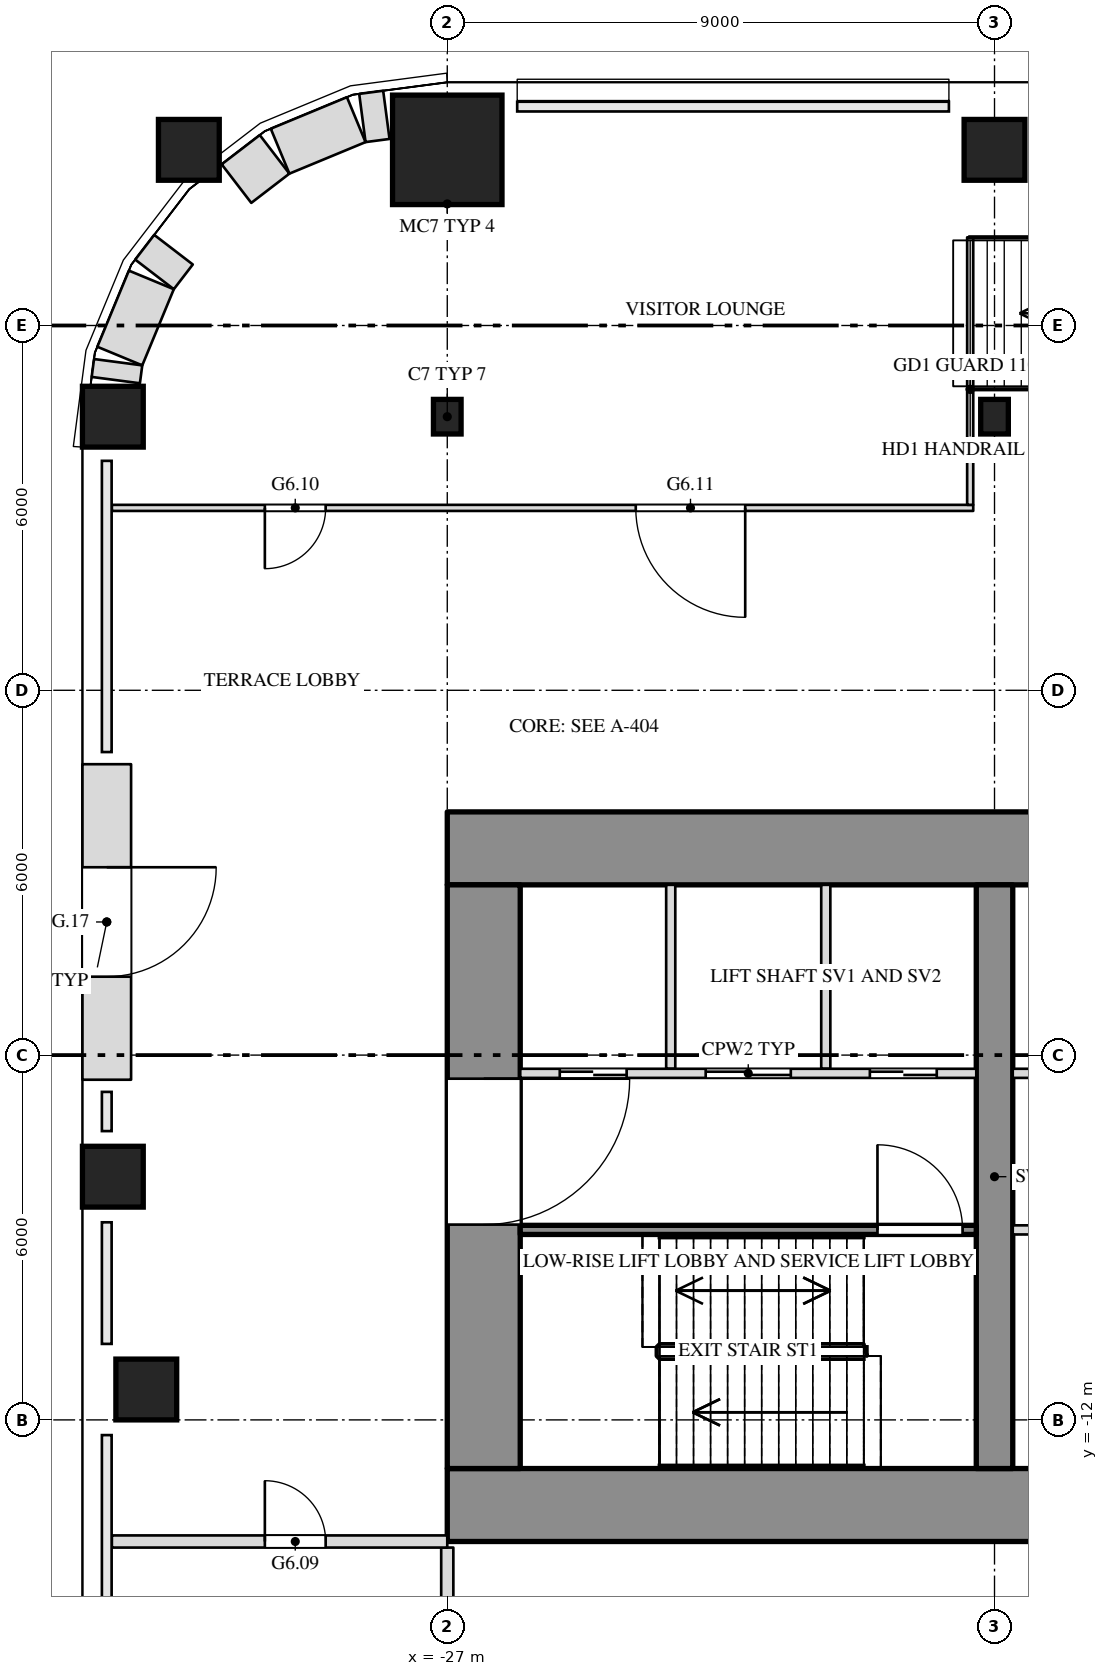
"""IFC4 building model, lengths in metres.
Left out: names, types, materials, properties, quantities, classifications, styles, units other than length and angle.
Written with IfcOpenShell. Run it as: python <this file> out.ifc"""

import sys

from ifc_helpers import new_model, si_unit, direction, frame, frame_2d, origin, origin_2d, place, context, subcontext, project, spatial, rectangle, i_section, extrude, clip, halfspace, element, fill, save


model = new_model("IFC4")
c1 = context("Model", 3, precision=1e-05, world=origin(), true_north=direction((0.0, 1.0)))
c2 = subcontext(c1, "Body", "Model", "MODEL_VIEW")
j1 = project(units=[si_unit("LENGTHUNIT", "METRE"), si_unit("PLANEANGLEUNIT", "RADIAN")], contexts=[c1])
p1 = place(None, origin())
s1 = spatial("IfcSite", under=j1, at=p1, CompositionType="ELEMENT")
p2 = place(p1, origin())
s2 = spatial("IfcBuilding", under=s1, at=p2, CompositionType="ELEMENT")
p3 = place(p2, frame((0.0, 0.0, 39.0)))
s3 = spatial("IfcBuildingStorey", under=s2, at=p3, CompositionType="ELEMENT", Elevation=39.0)
for number, where, z_axis, x_axis in (
    (1, (-31.95, -11.5, 0.0), (0.0, 0.0, 1.0), (1.0, 0.0, 0.0)),
    (2, (-32.5, -8.0, 0.0), (0.0, 0.0, 1.0), (1.0, 0.0, 0.0)),
    (3, (-32.5, 4.5, 0.0), (0.0, 0.0, 1.0), (1.0, 0.0, 0.0)),
):
    element("IfcColumn", number, at=place(p3, frame(where, z_axis=z_axis, x_axis=x_axis)), inside=s3, PredefinedType="COLUMN", context=c2, shape_type="SweptSolid", body=[
        extrude(rectangle(XDim=1.0, YDim=1.0, at=origin_2d()), origin(), (0.0, 0.0, 1.0), 4.5),
    ])
for number, where, z_axis, x_axis in (
    (4, (-27.0, 4.5, 0.0), (0.0, 0.0, 1.0), (1.0, 0.0, 0.0)),
    (5, (-18.0, 4.5, 0.0), (0.0, 0.0, 1.0), (1.0, 0.0, 0.0)),
):
    element("IfcColumn", number, at=place(p3, frame(where, z_axis=z_axis, x_axis=x_axis)), inside=s3, PredefinedType="COLUMN", context=c2, shape_type="SweptSolid", body=[
        extrude(i_section(OverallWidth=0.455, OverallDepth=0.569, WebThickness=0.078, FlangeThickness=0.125, at=origin_2d()), origin(), (0.0, 0.0, 1.0), 4.5),
    ])
p4 = place(p3, frame((-31.25, 8.0, 0.0), z_axis=(0.0, 0.595218167181, 0.80356414396), x_axis=(-1.0, 0.0, 0.0)))
e6 = element("IfcColumn", 6, at=p4, inside=s3, PredefinedType="COLUMN", context=c2, shape_type="Clipping", body=[
    clip(extrude(rectangle(XDim=1.0, YDim=1.0, at=origin_2d()), origin(), (0.0, 0.0, 1.0), 5.6), halfspace(frame((0.0, 0.0, 0.37)), True)),
])
p5 = place(p3, frame((-27.0, 8.0, 0.0), z_axis=(0.0, 0.595218167181, 0.80356414396), x_axis=(-1.0, 0.0, 0.0)))
e7 = element("IfcColumn", 7, at=p5, inside=s3, PredefinedType="COLUMN", context=c2, shape_type="Clipping", body=[
    clip(extrude(rectangle(XDim=1.8, YDim=1.8, at=origin_2d()), origin(), (0.0, 0.0, 1.0), 5.6), halfspace(frame((0.0, 0.0, 0.667)), True)),
])
p6 = place(p3, frame((-18.0, 8.0, 0.0), z_axis=(0.0, 0.595218167181, 0.80356414396), x_axis=(-1.0, 0.0, 0.0)))
e8 = element("IfcColumn", 8, at=p6, inside=s3, PredefinedType="COLUMN", context=c2, shape_type="Clipping", body=[
    clip(extrude(rectangle(XDim=1.0, YDim=1.0, at=origin_2d()), origin(), (0.0, 0.0, 1.0), 5.6), halfspace(frame((0.0, 0.0, 0.37)), True)),
])
p7 = place(p3, frame((-27.0, -2.6, 0.0), z_axis=(0.0, 0.0, 1.0), x_axis=(1.0, 0.0, 0.0)))
e9 = element("IfcWall", 9, at=p7, inside=s3, PredefinedType="SHEAR", context=c2, shape_type="SweptSolid", body=[
    extrude(rectangle(XDim=54.0, YDim=1.2, at=frame_2d((27.0, 0.0))), origin(), (0.0, 0.0, 1.0), 4.25),
])
p8 = place(p7, frame((15.15, 0.0, 0.0)))
e10 = element("IfcOpeningElement", 10, at=p8, cuts=e9, PredefinedType="OPENING", context=c2, shape_type="SweptSolid", body=[
    extrude(rectangle(XDim=2.4, YDim=2.1, at=frame_2d((1.2, 1.05))), frame((0.0, 0.612, 0.0), z_axis=(0.0, -1.0, 0.0), x_axis=(1.0, 0.0, 0.0)), (0.0, 0.0, 1.0), 1.224),
])
p9 = place(p7, frame((36.45, 0.0, 0.0)))
e11 = element("IfcOpeningElement", 11, at=p9, cuts=e9, PredefinedType="OPENING", context=c2, shape_type="SweptSolid", body=[
    extrude(rectangle(XDim=2.4, YDim=2.1, at=frame_2d((1.2, 1.05))), frame((0.0, 0.612, 0.0), z_axis=(0.0, -1.0, 0.0), x_axis=(1.0, 0.0, 0.0)), (0.0, 0.0, 1.0), 1.224),
])
p10 = place(p3, frame((-27.0, -13.4, 0.0), z_axis=(0.0, 0.0, 1.0), x_axis=(1.0, 0.0, 0.0)))
e12 = element("IfcWall", 12, at=p10, inside=s3, PredefinedType="SHEAR", context=c2, shape_type="SweptSolid", body=[
    extrude(rectangle(XDim=54.0, YDim=1.2, at=frame_2d((27.0, 0.0))), origin(), (0.0, 0.0, 1.0), 4.25),
])
p11 = place(p10, frame((16.45, 0.0, 0.0)))
e13 = element("IfcOpeningElement", 13, at=p11, cuts=e12, PredefinedType="OPENING", context=c2, shape_type="SweptSolid", body=[
    extrude(rectangle(XDim=1.0, YDim=2.1, at=frame_2d((0.5, 1.05))), frame((0.0, 0.612, 0.0), z_axis=(0.0, -1.0, 0.0), x_axis=(1.0, 0.0, 0.0)), (0.0, 0.0, 1.0), 1.224),
])
p12 = place(p10, frame((36.55, 0.0, 0.0)))
e14 = element("IfcOpeningElement", 14, at=p12, cuts=e12, PredefinedType="OPENING", context=c2, shape_type="SweptSolid", body=[
    extrude(rectangle(XDim=1.0, YDim=2.1, at=frame_2d((0.5, 1.05))), frame((0.0, 0.612, 0.0), z_axis=(0.0, -1.0, 0.0), x_axis=(1.0, 0.0, 0.0)), (0.0, 0.0, 1.0), 1.224),
])
p13 = place(p3, frame((-26.4, -12.8, 0.0), z_axis=(0.0, 0.0, 1.0), x_axis=(0.0, 1.0, 0.0)))
e15 = element("IfcWall", 15, at=p13, inside=s3, PredefinedType="SHEAR", context=c2, shape_type="SweptSolid", body=[
    extrude(rectangle(XDim=9.6, YDim=1.2, at=frame_2d((4.8, 0.0))), origin(), (0.0, 0.0, 1.0), 4.25),
])
p14 = place(p13, frame((4.012, 0.0, 0.0)))
e16 = element("IfcOpeningElement", 16, at=p14, cuts=e15, PredefinedType="OPENING", context=c2, shape_type="SweptSolid", body=[
    extrude(rectangle(XDim=2.4, YDim=2.1, at=frame_2d((1.2, 1.05))), frame((0.0, 0.612, 0.0), z_axis=(0.0, -1.0, 0.0), x_axis=(1.0, 0.0, 0.0)), (0.0, 0.0, 1.0), 1.224),
])
p15 = place(p3, frame((-18.0, -12.8, 0.0), z_axis=(0.0, 0.0, 1.0), x_axis=(0.0, 1.0, 0.0)))
e17 = element("IfcWall", 17, at=p15, inside=s3, PredefinedType="SHEAR", context=c2, shape_type="SweptSolid", body=[
    extrude(rectangle(XDim=9.6, YDim=0.6, at=frame_2d((4.8, 0.0))), origin(), (0.0, 0.0, 1.0), 4.25),
])
p16 = place(p3, frame((-27.0, -17.0, 0.0), z_axis=(0.0, 0.0, 1.0), x_axis=(0.0, 1.0, 0.0)))
e18 = element("IfcWall", 18, at=p16, inside=s3, PredefinedType="PARTITIONING", context=c2, shape_type="SweptSolid", body=[
    extrude(rectangle(XDim=2.9, YDim=0.2, at=frame_2d((1.45, 0.0))), origin(), (0.0, 0.0, 1.0), 3.638),
])
p17 = place(p3, frame((-32.516, -14.0, 0.0), z_axis=(0.0, 0.0, 1.0), x_axis=(1.0, 0.0, 0.0)))
e19 = element("IfcWall", 19, at=p17, inside=s3, PredefinedType="PARTITIONING", context=c2, shape_type="SweptSolid", body=[
    extrude(rectangle(XDim=5.516, YDim=0.2, at=frame_2d((2.758, 0.0))), origin(), (0.0, 0.0, 1.0), 4.25),
])
p18 = place(p17, frame((2.516, 0.0, 0.0)))
e20 = element("IfcOpeningElement", 20, at=p18, cuts=e19, PredefinedType="OPENING", context=c2, shape_type="SweptSolid", body=[
    extrude(rectangle(XDim=1.0, YDim=2.1, at=frame_2d((0.5, 1.05))), frame((0.0, 0.112, 0.0), z_axis=(0.0, -1.0, 0.0), x_axis=(1.0, 0.0, 0.0)), (0.0, 0.0, 1.0), 0.224),
])
p19 = place(p3, frame((-32.516, 3.0, 0.0), z_axis=(0.0, 0.0, 1.0), x_axis=(1.0, 0.0, 0.0)))
e21 = element("IfcWall", 21, at=p19, inside=s3, PredefinedType="PARTITIONING", context=c2, shape_type="SweptSolid", body=[
    extrude(rectangle(XDim=14.166, YDim=0.1, at=frame_2d((7.083, 0.0))), origin(), (0.0, 0.0, 1.0), 4.25),
])
p20 = place(p19, frame((2.516, 0.0, 0.0)))
e22 = element("IfcOpeningElement", 22, at=p20, cuts=e21, PredefinedType="OPENING", context=c2, shape_type="SweptSolid", body=[
    extrude(rectangle(XDim=1.0, YDim=2.1, at=frame_2d((0.5, 1.05))), frame((0.0, 0.062, 0.0), z_axis=(0.0, -1.0, 0.0), x_axis=(1.0, 0.0, 0.0)), (0.0, 0.0, 1.0), 0.124),
])
p21 = place(p19, frame((8.616, 0.0, 0.0)))
e23 = element("IfcOpeningElement", 23, at=p21, cuts=e21, PredefinedType="OPENING", context=c2, shape_type="SweptSolid", body=[
    extrude(rectangle(XDim=1.8, YDim=2.1, at=frame_2d((0.9, 1.05))), frame((0.0, 0.062, 0.0), z_axis=(0.0, -1.0, 0.0), x_axis=(1.0, 0.0, 0.0)), (0.0, 0.0, 1.0), 0.124),
])
p22 = place(p3, frame((-18.4, 3.05, 0.0), z_axis=(0.0, 0.0, 1.0), x_axis=(0.0, 1.0, 0.0)))
e24 = element("IfcWall", 24, at=p22, inside=s3, PredefinedType="PARTITIONING", context=c2, shape_type="SweptSolid", body=[
    extrude(rectangle(XDim=4.4, YDim=0.1, at=frame_2d((2.2, 0.0))), origin(), (0.0, 0.0, 1.0), 4.25),
])
p23 = place(p3, frame((-28.002, 9.465, 0.0), z_axis=(0.0, 0.0, 1.0), x_axis=(-0.99150434256, -0.130073589494, 0.0)))
e25 = element("IfcWall", 25, at=p23, inside=s3, PredefinedType="SOLIDWALL", context=c2, shape_type="SweptSolid", body=[
    extrude(rectangle(XDim=0.398, YDim=0.8, at=frame_2d((0.199, 0.0))), origin(), (0.0, 0.0, 1.0), 4.25),
])
p24 = place(p3, frame((-28.497, 9.386, 0.0), z_axis=(0.0, 0.0, 1.0), x_axis=(-0.923847774587, -0.38276009378, 0.0)))
e26 = element("IfcWall", 26, at=p24, inside=s3, PredefinedType="SOLIDWALL", context=c2, shape_type="SweptSolid", body=[
    extrude(rectangle(XDim=1.355, YDim=0.8, at=frame_2d((0.678, 0.0))), origin(), (0.0, 0.0, 1.0), 4.25),
])
p25 = place(p3, frame((-29.84, 8.815, 0.0), z_axis=(0.0, 0.0, 1.0), x_axis=(-0.793312797286, -0.608814262039, 0.0)))
e27 = element("IfcWall", 27, at=p25, inside=s3, PredefinedType="SOLIDWALL", context=c2, shape_type="SweptSolid", body=[
    extrude(rectangle(XDim=0.79, YDim=0.8, at=frame_2d((0.395, 0.0))), origin(), (0.0, 0.0, 1.0), 4.25),
])
p26 = place(p3, frame((-31.502, 7.247, 0.0), z_axis=(0.0, 0.0, 1.0), x_axis=(-0.608721260779, -0.793384160843, 0.0)))
e28 = element("IfcWall", 28, at=p26, inside=s3, PredefinedType="SOLIDWALL", context=c2, shape_type="SweptSolid", body=[
    extrude(rectangle(XDim=0.513, YDim=0.8, at=frame_2d((0.256, 0.0))), origin(), (0.0, 0.0, 1.0), 4.25),
])
p27 = place(p3, frame((-31.867, 6.75, 0.0), z_axis=(0.0, 0.0, 1.0), x_axis=(-0.38276009378, -0.923847774587, 0.0)))
e29 = element("IfcWall", 29, at=p27, inside=s3, PredefinedType="SOLIDWALL", context=c2, shape_type="SweptSolid", body=[
    extrude(rectangle(XDim=1.355, YDim=0.8, at=frame_2d((0.678, 0.0))), origin(), (0.0, 0.0, 1.0), 4.25),
])
p28 = place(p3, frame((-32.413, 5.396, 0.0), z_axis=(0.0, 0.0, 1.0), x_axis=(-0.129901534033, -0.991526899008, 0.0)))
e30 = element("IfcWall", 30, at=p28, inside=s3, PredefinedType="SOLIDWALL", context=c2, shape_type="SweptSolid", body=[
    extrude(rectangle(XDim=0.297, YDim=0.8, at=frame_2d((0.148, 0.0))), origin(), (0.0, 0.0, 1.0), 4.25),
])
p29 = place(p3, frame((-32.6, -1.216, 0.0), z_axis=(0.0, 0.0, 1.0), x_axis=(0.0, -1.0, 0.0)))
e31 = element("IfcWall", 31, at=p29, inside=s3, PredefinedType="SOLIDWALL", context=c2, shape_type="SweptSolid", body=[
    extrude(rectangle(XDim=5.189, YDim=0.8, at=frame_2d((2.595, 0.0))), origin(), (0.0, 0.0, 1.0), 4.25),
])
p30 = place(p29, frame((1.695, 0.0, 0.0)))
e32 = element("IfcOpeningElement", 32, at=p30, cuts=e31, PredefinedType="OPENING", context=c2, shape_type="SweptSolid", body=[
    extrude(rectangle(XDim=1.8, YDim=2.4, at=frame_2d((0.9, 1.2))), frame((0.0, 0.412, 0.0), z_axis=(0.0, -1.0, 0.0), x_axis=(1.0, 0.0, 0.0)), (0.0, 0.0, 1.0), 0.824),
])
for number, where, z_axis, x_axis in (
    (33, (-20.775, -6.225, 0.0), (0.0, 0.0, 1.0), (0.0, 1.0, 0.0)),
    (34, (-23.325, -6.225, 0.0), (0.0, 0.0, 1.0), (0.0, 1.0, 0.0)),
):
    element("IfcWall", number, at=place(p3, frame(where, z_axis=z_axis, x_axis=x_axis)), inside=s3, PredefinedType="PARTITIONING", context=c2, shape_type="SweptSolid", body=[
        extrude(rectangle(XDim=3.025, YDim=0.15, at=frame_2d((1.513, 0.0))), origin(), (0.0, 0.0, 1.0), 4.25),
    ])
p31 = place(p3, frame((-25.8, -6.3, 0.0), z_axis=(0.0, 0.0, 1.0), x_axis=(1.0, 0.0, 0.0)))
e35 = element("IfcWall", 35, at=p31, inside=s3, PredefinedType="PARTITIONING", context=c2, shape_type="SweptSolid", body=[
    extrude(rectangle(XDim=7.5, YDim=0.15, at=frame_2d((3.75, 0.0))), origin(), (0.0, 0.0, 1.0), 4.25),
])
p32 = place(p31, frame((0.65, 0.0, 0.0)))
e36 = element("IfcOpeningElement", 36, at=p32, cuts=e35, PredefinedType="OPENING", context=c2, shape_type="SweptSolid", body=[
    extrude(rectangle(XDim=1.1, YDim=2.1, at=frame_2d((0.55, 1.05))), frame((0.0, 0.087, 0.0), z_axis=(0.0, -1.0, 0.0), x_axis=(1.0, 0.0, 0.0)), (0.0, 0.0, 1.0), 0.174),
])
p33 = place(p31, frame((3.05, 0.0, 0.0)))
e37 = element("IfcOpeningElement", 37, at=p33, cuts=e35, PredefinedType="OPENING", context=c2, shape_type="SweptSolid", body=[
    extrude(rectangle(XDim=1.4, YDim=2.1, at=frame_2d((0.7, 1.05))), frame((0.0, 0.087, 0.0), z_axis=(0.0, -1.0, 0.0), x_axis=(1.0, 0.0, 0.0)), (0.0, 0.0, 1.0), 0.174),
])
p34 = place(p31, frame((5.75, 0.0, 0.0)))
e38 = element("IfcOpeningElement", 38, at=p34, cuts=e35, PredefinedType="OPENING", context=c2, shape_type="SweptSolid", body=[
    extrude(rectangle(XDim=1.1, YDim=2.1, at=frame_2d((0.55, 1.05))), frame((0.0, 0.087, 0.0), z_axis=(0.0, -1.0, 0.0), x_axis=(1.0, 0.0, 0.0)), (0.0, 0.0, 1.0), 0.174),
])
p35 = place(p3, frame((-17.7, -6.3, 0.0), z_axis=(0.0, 0.0, 1.0), x_axis=(1.0, 0.0, 0.0)))
e39 = element("IfcWall", 39, at=p35, inside=s3, PredefinedType="PARTITIONING", context=c2, shape_type="SweptSolid", body=[
    extrude(rectangle(XDim=5.7, YDim=0.15, at=frame_2d((2.85, 0.0))), origin(), (0.0, 0.0, 1.0), 4.25),
])
p36 = place(p35, frame((0.8, 0.0, 0.0)))
e40 = element("IfcOpeningElement", 40, at=p36, cuts=e39, PredefinedType="OPENING", context=c2, shape_type="SweptSolid", body=[
    extrude(rectangle(XDim=1.1, YDim=2.1, at=frame_2d((0.55, 1.05))), frame((0.0, 0.087, 0.0), z_axis=(0.0, -1.0, 0.0), x_axis=(1.0, 0.0, 0.0)), (0.0, 0.0, 1.0), 0.174),
])
p37 = place(p35, frame((3.65, 0.0, 0.0)))
e41 = element("IfcOpeningElement", 41, at=p37, cuts=e39, PredefinedType="OPENING", context=c2, shape_type="SweptSolid", body=[
    extrude(rectangle(XDim=1.1, YDim=2.1, at=frame_2d((0.55, 1.05))), frame((0.0, 0.087, 0.0), z_axis=(0.0, -1.0, 0.0), x_axis=(1.0, 0.0, 0.0)), (0.0, 0.0, 1.0), 0.174),
])
p38 = place(p3, frame((-25.8, -8.875, 0.0), z_axis=(0.0, 0.0, 1.0), x_axis=(1.0, 0.0, 0.0)))
e42 = element("IfcWall", 42, at=p38, inside=s3, PredefinedType="SHEAR", context=c2, shape_type="SweptSolid", body=[
    extrude(rectangle(XDim=7.5, YDim=0.15, at=frame_2d((3.75, 0.0))), origin(), (0.0, 0.0, 1.0), 4.25),
])
p39 = place(p38, frame((5.875, 0.0, 0.0)))
e43 = element("IfcOpeningElement", 43, at=p39, cuts=e42, PredefinedType="OPENING", context=c2, shape_type="SweptSolid", body=[
    extrude(rectangle(XDim=1.4, YDim=2.1, at=frame_2d((0.7, 1.05))), frame((0.0, 0.087, 0.0), z_axis=(0.0, -1.0, 0.0), x_axis=(1.0, 0.0, 0.0)), (0.0, 0.0, 1.0), 0.174),
])
p40 = place(p3, frame((-17.7, -8.875, 0.0), z_axis=(0.0, 0.0, 1.0), x_axis=(1.0, 0.0, 0.0)))
e44 = element("IfcWall", 44, at=p40, inside=s3, PredefinedType="PARTITIONING", context=c2, shape_type="SweptSolid", body=[
    extrude(rectangle(XDim=6.9, YDim=0.15, at=frame_2d((3.45, 0.0))), origin(), (0.0, 0.0, 1.0), 4.25),
])
p41 = place(p40, frame((0.8, 0.0, 0.0)))
e45 = element("IfcOpeningElement", 45, at=p41, cuts=e44, PredefinedType="OPENING", context=c2, shape_type="SweptSolid", body=[
    extrude(rectangle(XDim=1.1, YDim=2.1, at=frame_2d((0.55, 1.05))), frame((0.0, 0.087, 0.0), z_axis=(0.0, -1.0, 0.0), x_axis=(1.0, 0.0, 0.0)), (0.0, 0.0, 1.0), 0.174),
])
p42 = place(p40, frame((3.65, 0.0, 0.0)))
e46 = element("IfcOpeningElement", 46, at=p42, cuts=e44, PredefinedType="OPENING", context=c2, shape_type="SweptSolid", body=[
    extrude(rectangle(XDim=1.1, YDim=2.1, at=frame_2d((0.55, 1.05))), frame((0.0, 0.087, 0.0), z_axis=(0.0, -1.0, 0.0), x_axis=(1.0, 0.0, 0.0)), (0.0, 0.0, 1.0), 0.174),
])
p43 = place(p18, origin())
e47 = element("IfcDoor", 47, at=p43, inside=s3, OperationType="SINGLE_SWING_LEFT", PredefinedType="DOOR", context=c2, shape_type="SweptSolid", body=[
    extrude(rectangle(XDim=1.0, YDim=2.1, at=frame_2d((0.5, 1.05))), frame((0.0, 0.025, 0.0), z_axis=(0.0, -1.0, 0.0), x_axis=(1.0, 0.0, 0.0)), (0.0, 0.0, 1.0), 0.05),
])
fill(e20, e47)
p44 = place(p20, origin())
e48 = element("IfcDoor", 48, at=p44, inside=s3, OperationType="SINGLE_SWING_RIGHT", PredefinedType="DOOR", context=c2, shape_type="SweptSolid", body=[
    extrude(rectangle(XDim=1.0, YDim=2.1, at=frame_2d((0.5, 1.05))), frame((0.0, 0.025, 0.0), z_axis=(0.0, -1.0, 0.0), x_axis=(1.0, 0.0, 0.0)), (0.0, 0.0, 1.0), 0.05),
])
fill(e22, e48)
p45 = place(p21, origin())
e49 = element("IfcDoor", 49, at=p45, inside=s3, OperationType="DOUBLE_DOOR_SINGLE_SWING", PredefinedType="DOOR", context=c2, shape_type="SweptSolid", body=[
    extrude(rectangle(XDim=1.8, YDim=2.1, at=frame_2d((0.9, 1.05))), frame((0.0, 0.025, 0.0), z_axis=(0.0, -1.0, 0.0), x_axis=(1.0, 0.0, 0.0)), (0.0, 0.0, 1.0), 0.05),
])
fill(e23, e49)
p46 = place(p30, origin())
e50 = element("IfcDoor", 50, at=p46, inside=s3, OperationType="DOUBLE_DOOR_SINGLE_SWING", PredefinedType="DOOR", context=c2, shape_type="SweptSolid", body=[
    extrude(rectangle(XDim=1.8, YDim=2.4, at=frame_2d((0.9, 1.2))), frame((0.0, 0.025, 0.0), z_axis=(0.0, -1.0, 0.0), x_axis=(1.0, 0.0, 0.0)), (0.0, 0.0, 1.0), 0.05),
])
fill(e32, e50)
p47 = place(p14, origin())
e51 = element("IfcDoor", 51, at=p47, inside=s3, OperationType="DOUBLE_DOOR_SINGLE_SWING", PredefinedType="DOOR", context=c2, shape_type="SweptSolid", body=[
    extrude(rectangle(XDim=2.4, YDim=2.1, at=frame_2d((1.2, 1.05))), frame((0.0, 0.025, 0.0), z_axis=(0.0, -1.0, 0.0), x_axis=(1.0, 0.0, 0.0)), (0.0, 0.0, 1.0), 0.05),
])
fill(e16, e51)
p48 = place(p32, origin())
e52 = element("IfcDoor", 52, at=p48, inside=s3, OperationType="SLIDING_TO_RIGHT", PredefinedType="DOOR", context=c2, shape_type="SweptSolid", body=[
    extrude(rectangle(XDim=1.1, YDim=2.1, at=frame_2d((0.55, 1.05))), frame((0.0, 0.025, 0.0), z_axis=(0.0, -1.0, 0.0), x_axis=(1.0, 0.0, 0.0)), (0.0, 0.0, 1.0), 0.05),
])
fill(e36, e52)
p49 = place(p33, origin())
e53 = element("IfcDoor", 53, at=p49, inside=s3, OperationType="SLIDING_TO_LEFT", PredefinedType="DOOR", context=c2, shape_type="SweptSolid", body=[
    extrude(rectangle(XDim=1.4, YDim=2.1, at=frame_2d((0.7, 1.05))), frame((0.0, 0.025, 0.0), z_axis=(0.0, -1.0, 0.0), x_axis=(1.0, 0.0, 0.0)), (0.0, 0.0, 1.0), 0.05),
])
fill(e37, e53)
p50 = place(p34, origin())
e54 = element("IfcDoor", 54, at=p50, inside=s3, OperationType="SLIDING_TO_RIGHT", PredefinedType="DOOR", context=c2, shape_type="SweptSolid", body=[
    extrude(rectangle(XDim=1.1, YDim=2.1, at=frame_2d((0.55, 1.05))), frame((0.0, 0.025, 0.0), z_axis=(0.0, -1.0, 0.0), x_axis=(1.0, 0.0, 0.0)), (0.0, 0.0, 1.0), 0.05),
])
fill(e38, e54)
p51 = place(p39, origin())
e55 = element("IfcDoor", 55, at=p51, inside=s3, OperationType="DOUBLE_DOOR_SINGLE_SWING", PredefinedType="DOOR", context=c2, shape_type="SweptSolid", body=[
    extrude(rectangle(XDim=1.4, YDim=2.1, at=frame_2d((0.7, 1.05))), frame((0.0, 0.025, 0.0), z_axis=(0.0, -1.0, 0.0), x_axis=(1.0, 0.0, 0.0)), (0.0, 0.0, 1.0), 0.05),
])
fill(e43, e55)
save(model, sys.argv[1])
